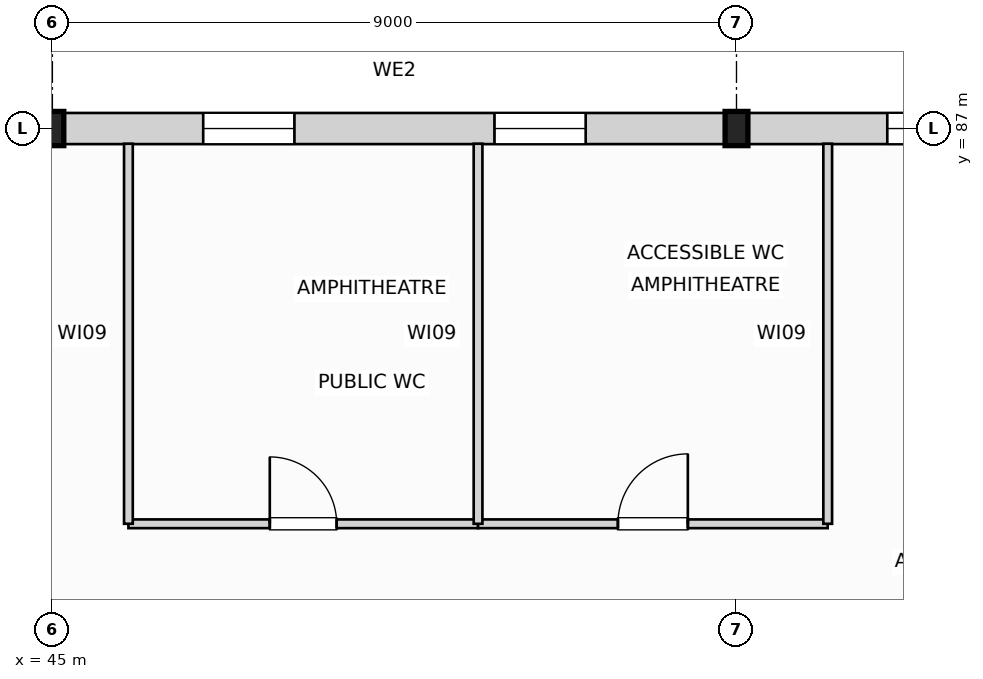
"""IFC4 building model, lengths in metres.
Left out: names, types, materials, properties, quantities, classifications, styles, units other than length and angle.
Written with IfcOpenShell. Run it as: python <this file> out.ifc"""

import sys

from ifc_helpers import new_model, si_unit, direction, frame, frame_2d, origin, origin_2d, place, context, subcontext, project, spatial, rectangle, i_section, extrude, element, fill, save


model = new_model("IFC4")
c1 = context("Model", 3, precision=1e-05, world=origin(), true_north=direction((0.0, 1.0)))
c2 = subcontext(c1, "Body", "Model", "MODEL_VIEW")
j1 = project(units=[si_unit("LENGTHUNIT", "METRE"), si_unit("PLANEANGLEUNIT", "RADIAN")], contexts=[c1])
p1 = place(None, origin())
s1 = spatial("IfcSite", under=j1, at=p1, CompositionType="ELEMENT")
p2 = place(p1, origin())
s2 = spatial("IfcBuilding", under=s1, at=p2, CompositionType="ELEMENT")
p3 = place(p2, frame((0.0, 0.0, 26.4)))
s3 = spatial("IfcBuildingStorey", under=s2, at=p3, CompositionType="ELEMENT", Elevation=26.4)
for number, where, z_axis, x_axis in (
    (1, (45.0, 87.0, 0.0), (0.0, 0.0, 1.0), (1.0, 0.0, 0.0)),
    (2, (54.0, 87.0, 0.0), (0.0, 0.0, 1.0), (1.0, 0.0, 0.0)),
):
    element("IfcColumn", number, at=place(p3, frame(where, z_axis=z_axis, x_axis=x_axis)), inside=s3, PredefinedType="COLUMN", context=c2, shape_type="SweptSolid", body=[
        extrude(i_section(OverallWidth=0.3, OverallDepth=0.45, WebThickness=0.014, FlangeThickness=0.026, at=origin_2d()), origin(), (0.0, 0.0, 1.0), 4.2),
    ])
p4 = place(p3, frame((45.145, 87.0, 0.0), z_axis=(0.0, 0.0, 1.0), x_axis=(1.0, 0.0, 0.0)))
e3 = element("IfcWall", 3, at=p4, inside=s3, PredefinedType="SOLIDWALL", context=c2, shape_type="SweptSolid", body=[
    extrude(rectangle(XDim=8.71, YDim=0.41, at=frame_2d((4.355, 0.0))), origin(), (0.0, 0.0, 1.0), 3.255),
])
p5 = place(p4, frame((1.839, 0.0, 0.85)))
e4 = element("IfcOpeningElement", 4, at=p5, cuts=e3, PredefinedType="OPENING", context=c2, shape_type="SweptSolid", body=[
    extrude(rectangle(XDim=1.2, YDim=1.95, at=frame_2d((0.6, 0.975))), frame((0.0, 0.215, 0.0), z_axis=(0.0, -1.0, 0.0), x_axis=(1.0, 0.0, 0.0)), (0.0, 0.0, 1.0), 0.43),
])
p6 = place(p4, frame((5.671, 0.0, 0.85)))
e5 = element("IfcOpeningElement", 5, at=p6, cuts=e3, PredefinedType="OPENING", context=c2, shape_type="SweptSolid", body=[
    extrude(rectangle(XDim=1.2, YDim=1.95, at=frame_2d((0.6, 0.975))), frame((0.0, 0.215, 0.0), z_axis=(0.0, -1.0, 0.0), x_axis=(1.0, 0.0, 0.0)), (0.0, 0.0, 1.0), 0.43),
])
p7 = place(p3, frame((54.145, 87.0, 0.0), z_axis=(0.0, 0.0, 1.0), x_axis=(1.0, 0.0, 0.0)))
e6 = element("IfcWall", 6, at=p7, inside=s3, PredefinedType="SOLIDWALL", context=c2, shape_type="SweptSolid", body=[
    extrude(rectangle(XDim=8.71, YDim=0.41, at=frame_2d((4.355, 0.0))), origin(), (0.0, 0.0, 1.0), 3.205),
])
p8 = place(p7, frame((1.839, 0.0, 0.85)))
e7 = element("IfcOpeningElement", 7, at=p8, cuts=e6, PredefinedType="OPENING", context=c2, shape_type="SweptSolid", body=[
    extrude(rectangle(XDim=1.2, YDim=1.95, at=frame_2d((0.6, 0.975))), frame((0.0, 0.215, 0.0), z_axis=(0.0, -1.0, 0.0), x_axis=(1.0, 0.0, 0.0)), (0.0, 0.0, 1.0), 0.43),
])
p9 = place(p7, frame((5.671, 0.0, 0.85)))
e8 = element("IfcOpeningElement", 8, at=p9, cuts=e6, PredefinedType="OPENING", context=c2, shape_type="SweptSolid", body=[
    extrude(rectangle(XDim=1.2, YDim=1.95, at=frame_2d((0.6, 0.975))), frame((0.0, 0.215, 0.0), z_axis=(0.0, -1.0, 0.0), x_axis=(1.0, 0.0, 0.0)), (0.0, 0.0, 1.0), 0.43),
])
p10 = place(p3, frame((46.0, 81.8, 0.0), z_axis=(0.0, 0.0, 1.0), x_axis=(1.0, 0.0, 0.0)))
e9 = element("IfcWall", 9, at=p10, inside=s3, PredefinedType="PARTITIONING", context=c2, shape_type="SweptSolid", body=[
    extrude(rectangle(XDim=4.6, YDim=0.115, at=frame_2d((2.3, 0.0))), origin(), (0.0, 0.0, 1.0), 3.905),
])
p11 = place(p10, frame((1.86, 0.0, 0.0)))
e10 = element("IfcOpeningElement", 10, at=p11, cuts=e9, PredefinedType="OPENING", context=c2, shape_type="SweptSolid", body=[
    extrude(rectangle(XDim=0.88, YDim=2.06, at=frame_2d((0.44, 1.03))), frame((0.0, 0.067, 0.0), z_axis=(0.0, -1.0, 0.0), x_axis=(1.0, 0.0, 0.0)), (0.0, 0.0, 1.0), 0.135),
])
p12 = place(p3, frame((50.6, 81.8, 0.0), z_axis=(0.0, 0.0, 1.0), x_axis=(1.0, 0.0, 0.0)))
e11 = element("IfcWall", 11, at=p12, inside=s3, PredefinedType="PARTITIONING", context=c2, shape_type="SweptSolid", body=[
    extrude(rectangle(XDim=4.6, YDim=0.115, at=frame_2d((2.3, 0.0))), origin(), (0.0, 0.0, 1.0), 3.545),
])
p13 = place(p12, frame((1.84, 0.0, 0.0)))
e12 = element("IfcOpeningElement", 12, at=p13, cuts=e11, PredefinedType="OPENING", context=c2, shape_type="SweptSolid", body=[
    extrude(rectangle(XDim=0.92, YDim=2.08, at=frame_2d((0.46, 1.04))), frame((0.0, 0.067, 0.0), z_axis=(0.0, -1.0, 0.0), x_axis=(1.0, 0.0, 0.0)), (0.0, 0.0, 1.0), 0.135),
])
for number, where, z_axis, x_axis in (
    (13, (46.0, 81.8, 0.0), (0.0, 0.0, 1.0), (0.0, 1.0, 0.0)),
    (14, (50.6, 81.8, 0.0), (0.0, 0.0, 1.0), (0.0, 1.0, 0.0)),
):
    element("IfcWall", number, at=place(p3, frame(where, z_axis=z_axis, x_axis=x_axis)), inside=s3, PredefinedType="PARTITIONING", context=c2, shape_type="SweptSolid", body=[
        extrude(rectangle(XDim=5.0, YDim=0.115, at=frame_2d((2.5, 0.0))), origin(), (0.0, 0.0, 1.0), 3.305),
    ])
p14 = place(p3, frame((55.2, 81.8, 0.0), z_axis=(0.0, 0.0, 1.0), x_axis=(0.0, 1.0, 0.0)))
e15 = element("IfcWall", 15, at=p14, inside=s3, PredefinedType="PARTITIONING", context=c2, shape_type="SweptSolid", body=[
    extrude(rectangle(XDim=5.0, YDim=0.115, at=frame_2d((2.5, 0.0))), origin(), (0.0, 0.0, 1.0), 3.355),
])
p15 = place(p5, origin())
e16 = element("IfcWindow", 16, at=p15, inside=s3, PartitioningType="SINGLE_PANEL", PredefinedType="WINDOW", context=c2, shape_type="SweptSolid", body=[
    extrude(rectangle(XDim=1.2, YDim=1.95, at=frame_2d((0.6, 0.975))), frame((0.0, 0.03, 0.0), z_axis=(0.0, -1.0, 0.0), x_axis=(1.0, 0.0, 0.0)), (0.0, 0.0, 1.0), 0.06),
])
fill(e4, e16)
p16 = place(p6, origin())
e17 = element("IfcWindow", 17, at=p16, inside=s3, PartitioningType="SINGLE_PANEL", PredefinedType="WINDOW", context=c2, shape_type="SweptSolid", body=[
    extrude(rectangle(XDim=1.2, YDim=1.95, at=frame_2d((0.6, 0.975))), frame((0.0, 0.03, 0.0), z_axis=(0.0, -1.0, 0.0), x_axis=(1.0, 0.0, 0.0)), (0.0, 0.0, 1.0), 0.06),
])
fill(e5, e17)
p17 = place(p8, origin())
e18 = element("IfcWindow", 18, at=p17, inside=s3, PartitioningType="SINGLE_PANEL", PredefinedType="WINDOW", context=c2, shape_type="SweptSolid", body=[
    extrude(rectangle(XDim=1.2, YDim=1.95, at=frame_2d((0.6, 0.975))), frame((0.0, 0.03, 0.0), z_axis=(0.0, -1.0, 0.0), x_axis=(1.0, 0.0, 0.0)), (0.0, 0.0, 1.0), 0.06),
])
fill(e7, e18)
p18 = place(p11, origin())
e19 = element("IfcDoor", 19, at=p18, inside=s3, OperationType="SINGLE_SWING_LEFT", PredefinedType="DOOR", context=c2, shape_type="SweptSolid", body=[
    extrude(rectangle(XDim=0.88, YDim=2.06, at=frame_2d((0.44, 1.03))), frame((0.0, 0.025, 0.0), z_axis=(0.0, -1.0, 0.0), x_axis=(1.0, 0.0, 0.0)), (0.0, 0.0, 1.0), 0.05),
])
fill(e10, e19)
p19 = place(p13, origin())
e20 = element("IfcDoor", 20, at=p19, inside=s3, OperationType="SINGLE_SWING_RIGHT", PredefinedType="DOOR", context=c2, shape_type="SweptSolid", body=[
    extrude(rectangle(XDim=0.92, YDim=2.08, at=frame_2d((0.46, 1.04))), frame((0.0, 0.025, 0.0), z_axis=(0.0, -1.0, 0.0), x_axis=(1.0, 0.0, 0.0)), (0.0, 0.0, 1.0), 0.05),
])
fill(e12, e20)
save(model, sys.argv[1])
